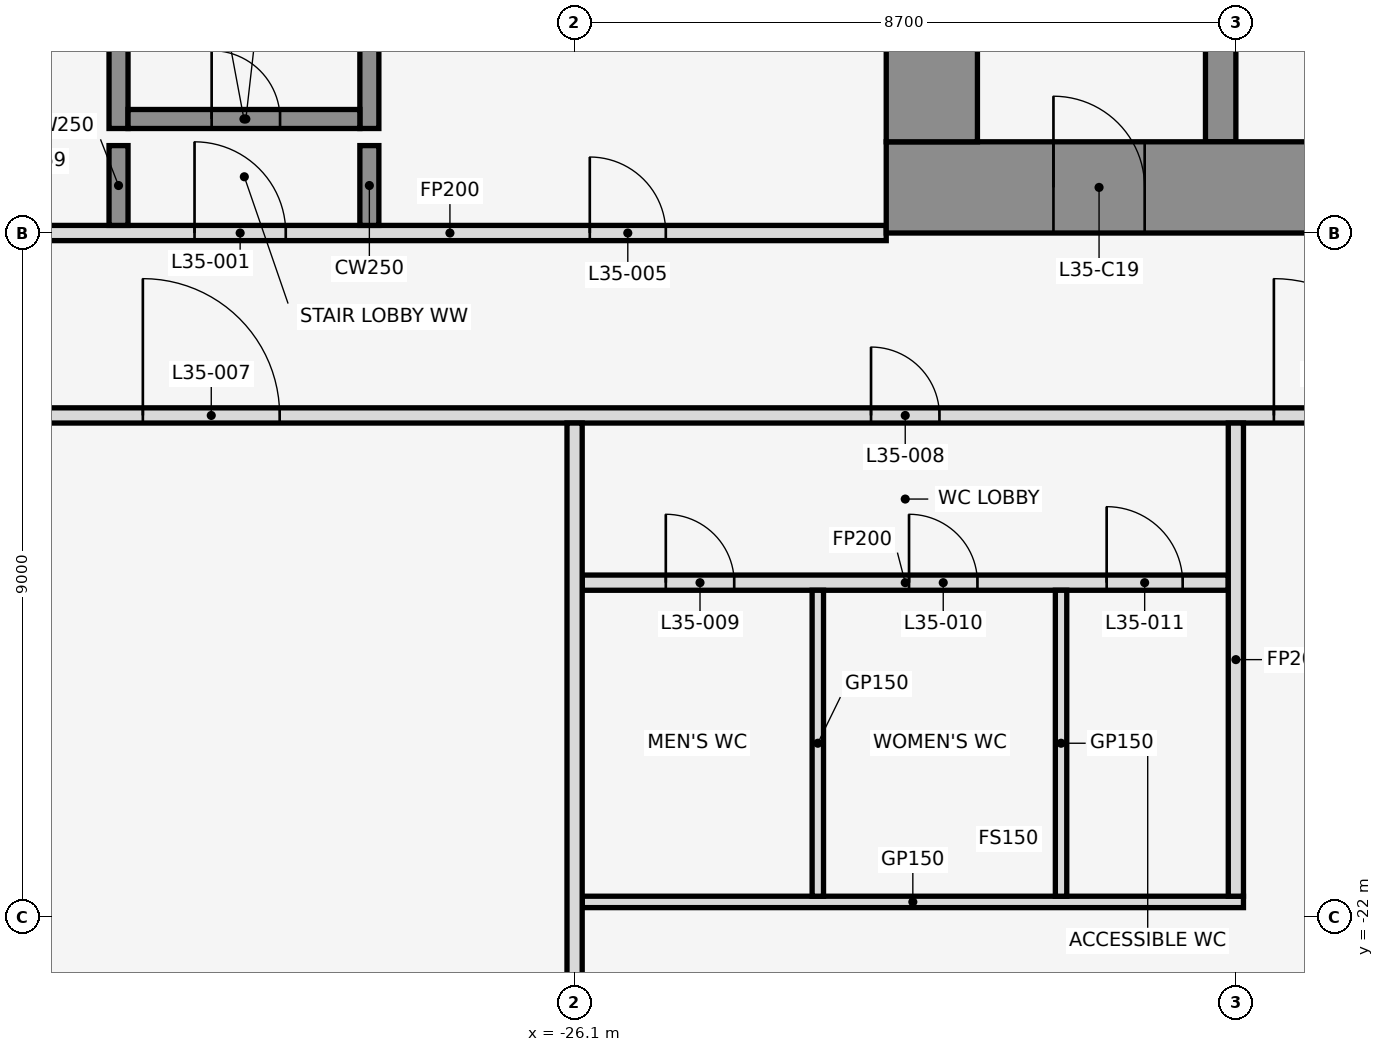
"""IFC4 building model, lengths in metres.
Left out: names, types, materials, properties, quantities, classifications, styles, units other than length and angle.
Written with IfcOpenShell. Run it as: python <this file> out.ifc"""

import sys

from ifc_helpers import new_model, si_unit, direction, frame, frame_2d, origin, place, context, subcontext, project, spatial, rectangle, extrude, element, fill, save


model = new_model("IFC4")
c1 = context("Model", 3, precision=1e-05, world=origin(), true_north=direction((0.0, 1.0)))
c2 = subcontext(c1, "Body", "Model", "MODEL_VIEW")
j1 = project(units=[si_unit("LENGTHUNIT", "METRE"), si_unit("PLANEANGLEUNIT", "RADIAN")], contexts=[c1])
p1 = place(None, origin())
s1 = spatial("IfcSite", under=j1, at=p1, CompositionType="ELEMENT")
p2 = place(p1, origin())
s2 = spatial("IfcBuilding", under=s1, at=p2, CompositionType="ELEMENT")
p3 = place(p2, frame((0.0, 0.0, 160.9)))
s3 = spatial("IfcBuildingStorey", under=s2, at=p3, CompositionType="ELEMENT", Elevation=160.9)
p4 = place(p3, frame((-32.1, -11.625, 0.0), z_axis=(0.0, 0.0, 1.0), x_axis=(0.0, 1.0, 0.0)))
e1 = element("IfcWall", 1, at=p4, inside=s3, PredefinedType="SHEAR", context=c2, shape_type="SweptSolid", body=[
    extrude(rectangle(XDim=7.325, YDim=0.25, at=frame_2d((3.663, 0.0))), origin(), (0.0, 0.0, 1.0), 4.1),
])
p5 = place(p3, frame((-28.8, -11.625, 0.0), z_axis=(0.0, 0.0, 1.0), x_axis=(0.0, 1.0, 0.0)))
e2 = element("IfcWall", 2, at=p5, inside=s3, PredefinedType="SHEAR", context=c2, shape_type="SweptSolid", body=[
    extrude(rectangle(XDim=7.25, YDim=0.25, at=frame_2d((3.625, 0.0))), origin(), (0.0, 0.0, 1.0), 4.1),
])
p6 = place(p3, frame((-31.975, -11.5, 0.0), z_axis=(0.0, 0.0, 1.0), x_axis=(1.0, 0.0, 0.0)))
e3 = element("IfcWall", 3, at=p6, inside=s3, PredefinedType="SHEAR", context=c2, shape_type="SweptSolid", body=[
    extrude(rectangle(XDim=3.05, YDim=0.25, at=frame_2d((1.525, 0.0))), origin(), (0.0, 0.0, 1.0), 4.1),
])
p7 = place(p6, frame((1.1, 0.0, 0.0)))
e4 = element("IfcOpeningElement", 4, at=p7, cuts=e3, PredefinedType="OPENING", context=c2, shape_type="SweptSolid", body=[
    extrude(rectangle(XDim=0.9, YDim=2.1, at=frame_2d((0.45, 1.05))), frame((0.0, 0.137, 0.0), z_axis=(0.0, -1.0, 0.0), x_axis=(1.0, 0.0, 0.0)), (0.0, 0.0, 1.0), 0.274),
])
p8 = place(p3, frame((-26.0, -21.8, 0.0), z_axis=(0.0, 0.0, 1.0), x_axis=(1.0, 0.0, 0.0)))
e5 = element("IfcWall", 5, at=p8, inside=s3, PredefinedType="PARTITIONING", context=c2, shape_type="SweptSolid", body=[
    extrude(rectangle(XDim=8.7, YDim=0.15, at=frame_2d((4.35, 0.0))), origin(), (0.0, 0.0, 1.0), 2.841),
])
p9 = place(p3, frame((-26.0, -17.6, 0.0), z_axis=(0.0, 0.0, 1.0), x_axis=(1.0, 0.0, 0.0)))
e6 = element("IfcWall", 6, at=p9, inside=s3, PredefinedType="PARTITIONING", context=c2, shape_type="SweptSolid", body=[
    extrude(rectangle(XDim=8.5, YDim=0.2, at=frame_2d((4.25, 0.0))), origin(), (0.0, 0.0, 1.0), 2.841),
])
p10 = place(p9, frame((1.1, 0.0, 0.0)))
e7 = element("IfcOpeningElement", 7, at=p10, cuts=e6, PredefinedType="OPENING", context=c2, shape_type="SweptSolid", body=[
    extrude(rectangle(XDim=0.9, YDim=2.1, at=frame_2d((0.45, 1.05))), frame((0.0, 0.112, 0.0), z_axis=(0.0, -1.0, 0.0), x_axis=(1.0, 0.0, 0.0)), (0.0, 0.0, 1.0), 0.224),
])
p11 = place(p9, frame((4.3, 0.0, 0.0)))
e8 = element("IfcOpeningElement", 8, at=p11, cuts=e6, PredefinedType="OPENING", context=c2, shape_type="SweptSolid", body=[
    extrude(rectangle(XDim=0.9, YDim=2.1, at=frame_2d((0.45, 1.05))), frame((0.0, 0.112, 0.0), z_axis=(0.0, -1.0, 0.0), x_axis=(1.0, 0.0, 0.0)), (0.0, 0.0, 1.0), 0.224),
])
p12 = place(p9, frame((6.9, 0.0, 0.0)))
e9 = element("IfcOpeningElement", 9, at=p12, cuts=e6, PredefinedType="OPENING", context=c2, shape_type="SweptSolid", body=[
    extrude(rectangle(XDim=1.0, YDim=2.1, at=frame_2d((0.5, 1.05))), frame((0.0, 0.112, 0.0), z_axis=(0.0, -1.0, 0.0), x_axis=(1.0, 0.0, 0.0)), (0.0, 0.0, 1.0), 0.224),
])
p13 = place(p3, frame((-35.68, -15.4, 0.0), z_axis=(0.0, 0.0, 1.0), x_axis=(1.0, 0.0, 0.0)))
e10 = element("IfcWall", 10, at=p13, inside=s3, PredefinedType="PARTITIONING", context=c2, shape_type="SweptSolid", body=[
    extrude(rectangle(XDim=71.36, YDim=0.2, at=frame_2d((35.68, 0.0))), origin(), (0.0, 0.0, 1.0), 2.841),
])
p14 = place(p13, frame((3.9, 0.0, 0.0)))
e11 = element("IfcOpeningElement", 11, at=p14, cuts=e10, PredefinedType="OPENING", context=c2, shape_type="SweptSolid", body=[
    extrude(rectangle(XDim=1.8, YDim=2.1, at=frame_2d((0.9, 1.05))), frame((0.0, 0.112, 0.0), z_axis=(0.0, -1.0, 0.0), x_axis=(1.0, 0.0, 0.0)), (0.0, 0.0, 1.0), 0.224),
])
p15 = place(p13, frame((13.48, 0.0, 0.0)))
e12 = element("IfcOpeningElement", 12, at=p15, cuts=e10, PredefinedType="OPENING", context=c2, shape_type="SweptSolid", body=[
    extrude(rectangle(XDim=0.9, YDim=2.1, at=frame_2d((0.45, 1.05))), frame((0.0, 0.112, 0.0), z_axis=(0.0, -1.0, 0.0), x_axis=(1.0, 0.0, 0.0)), (0.0, 0.0, 1.0), 0.224),
])
p16 = place(p13, frame((18.78, 0.0, 0.0)))
e13 = element("IfcOpeningElement", 13, at=p16, cuts=e10, PredefinedType="OPENING", context=c2, shape_type="SweptSolid", body=[
    extrude(rectangle(XDim=1.8, YDim=2.1, at=frame_2d((0.9, 1.05))), frame((0.0, 0.112, 0.0), z_axis=(0.0, -1.0, 0.0), x_axis=(1.0, 0.0, 0.0)), (0.0, 0.0, 1.0), 0.224),
])
p17 = place(p13, frame((24.58, 0.0, 0.0)))
e14 = element("IfcOpeningElement", 14, at=p17, cuts=e10, PredefinedType="OPENING", context=c2, shape_type="SweptSolid", body=[
    extrude(rectangle(XDim=1.8, YDim=2.1, at=frame_2d((0.9, 1.05))), frame((0.0, 0.112, 0.0), z_axis=(0.0, -1.0, 0.0), x_axis=(1.0, 0.0, 0.0)), (0.0, 0.0, 1.0), 0.224),
])
p18 = place(p13, frame((34.78, 0.0, 0.0)))
e15 = element("IfcOpeningElement", 15, at=p18, cuts=e10, PredefinedType="OPENING", context=c2, shape_type="SweptSolid", body=[
    extrude(rectangle(XDim=1.8, YDim=2.1, at=frame_2d((0.9, 1.05))), frame((0.0, 0.112, 0.0), z_axis=(0.0, -1.0, 0.0), x_axis=(1.0, 0.0, 0.0)), (0.0, 0.0, 1.0), 0.224),
])
p19 = place(p13, frame((43.48, 0.0, 0.0)))
e16 = element("IfcOpeningElement", 16, at=p19, cuts=e10, PredefinedType="OPENING", context=c2, shape_type="SweptSolid", body=[
    extrude(rectangle(XDim=1.8, YDim=2.1, at=frame_2d((0.9, 1.05))), frame((0.0, 0.112, 0.0), z_axis=(0.0, -1.0, 0.0), x_axis=(1.0, 0.0, 0.0)), (0.0, 0.0, 1.0), 0.224),
])
p20 = place(p13, frame((52.18, 0.0, 0.0)))
e17 = element("IfcOpeningElement", 17, at=p20, cuts=e10, PredefinedType="OPENING", context=c2, shape_type="SweptSolid", body=[
    extrude(rectangle(XDim=1.8, YDim=2.1, at=frame_2d((0.9, 1.05))), frame((0.0, 0.112, 0.0), z_axis=(0.0, -1.0, 0.0), x_axis=(1.0, 0.0, 0.0)), (0.0, 0.0, 1.0), 0.224),
])
p21 = place(p13, frame((64.18, 0.0, 0.0)))
e18 = element("IfcOpeningElement", 18, at=p21, cuts=e10, PredefinedType="OPENING", context=c2, shape_type="SweptSolid", body=[
    extrude(rectangle(XDim=1.8, YDim=2.1, at=frame_2d((0.9, 1.05))), frame((0.0, 0.112, 0.0), z_axis=(0.0, -1.0, 0.0), x_axis=(1.0, 0.0, 0.0)), (0.0, 0.0, 1.0), 0.224),
])
p22 = place(p3, frame((-33.48, -13.0, 0.0), z_axis=(0.0, 0.0, 1.0), x_axis=(1.0, 0.0, 0.0)))
e19 = element("IfcWall", 19, at=p22, inside=s3, PredefinedType="PARTITIONING", context=c2, shape_type="SweptSolid", body=[
    extrude(rectangle(XDim=11.48, YDim=0.2, at=frame_2d((5.74, 0.0))), origin(), (0.0, 0.0, 1.0), 2.841),
])
p23 = place(p22, frame((2.38, 0.0, 0.0)))
e20 = element("IfcOpeningElement", 20, at=p23, cuts=e19, PredefinedType="OPENING", context=c2, shape_type="SweptSolid", body=[
    extrude(rectangle(XDim=1.2, YDim=2.1, at=frame_2d((0.6, 1.05))), frame((0.0, 0.112, 0.0), z_axis=(0.0, -1.0, 0.0), x_axis=(1.0, 0.0, 0.0)), (0.0, 0.0, 1.0), 0.224),
])
p24 = place(p22, frame((7.58, 0.0, 0.0)))
e21 = element("IfcOpeningElement", 21, at=p24, cuts=e19, PredefinedType="OPENING", context=c2, shape_type="SweptSolid", body=[
    extrude(rectangle(XDim=1.0, YDim=2.1, at=frame_2d((0.5, 1.05))), frame((0.0, 0.112, 0.0), z_axis=(0.0, -1.0, 0.0), x_axis=(1.0, 0.0, 0.0)), (0.0, 0.0, 1.0), 0.224),
])
for number, where, z_axis, x_axis in (
    (22, (-32.1, -12.9, 0.0), (0.0, 0.0, 1.0), (0.0, 1.0, 0.0)),
    (23, (-28.8, -12.9, 0.0), (0.0, 0.0, 1.0), (0.0, 1.0, 0.0)),
):
    element("IfcWall", number, at=place(p3, frame(where, z_axis=z_axis, x_axis=x_axis)), inside=s3, PredefinedType="SHEAR", context=c2, shape_type="SweptSolid", body=[
        extrude(rectangle(XDim=1.05, YDim=0.25, at=frame_2d((0.525, 0.0))), origin(), (0.0, 0.0, 1.0), 4.1),
    ])
p25 = place(p3, frame((-26.1, -34.71, 0.0), z_axis=(0.0, 0.0, 1.0), x_axis=(0.0, 1.0, 0.0)))
e24 = element("IfcWall", 24, at=p25, inside=s3, PredefinedType="PARTITIONING", context=c2, shape_type="SweptSolid", body=[
    extrude(rectangle(XDim=19.21, YDim=0.2, at=frame_2d((9.605, 0.0))), origin(), (0.0, 0.0, 1.0), 2.841),
])
for number, where, z_axis, x_axis in (
    (25, (-22.9, -21.725, 0.0), (0.0, 0.0, 1.0), (0.0, 1.0, 0.0)),
    (26, (-19.7, -21.725, 0.0), (0.0, 0.0, 1.0), (0.0, 1.0, 0.0)),
):
    element("IfcWall", number, at=place(p3, frame(where, z_axis=z_axis, x_axis=x_axis)), inside=s3, PredefinedType="PARTITIONING", context=c2, shape_type="SweptSolid", body=[
        extrude(rectangle(XDim=4.025, YDim=0.15, at=frame_2d((2.013, 0.0))), origin(), (0.0, 0.0, 1.0), 2.841),
    ])
p26 = place(p3, frame((-17.4, -21.725, 0.0), z_axis=(0.0, 0.0, 1.0), x_axis=(0.0, 1.0, 0.0)))
e27 = element("IfcWall", 27, at=p26, inside=s3, PredefinedType="PARTITIONING", context=c2, shape_type="SweptSolid", body=[
    extrude(rectangle(XDim=6.225, YDim=0.2, at=frame_2d((3.113, 0.0))), origin(), (0.0, 0.0, 1.0), 2.841),
])
p27 = place(p3, frame((-17.6, -11.8, 0.0), z_axis=(0.0, 0.0, 1.0), x_axis=(0.0, 1.0, 0.0)))
e28 = element("IfcWall", 28, at=p27, inside=s3, PredefinedType="SHEAR", context=c2, shape_type="SweptSolid", body=[
    extrude(rectangle(XDim=10.6, YDim=0.4, at=frame_2d((5.3, 0.0))), origin(), (0.0, 0.0, 1.0), 4.1),
])
p28 = place(p27, frame((1.25, 0.0, 0.0)))
e29 = element("IfcOpeningElement", 29, at=p28, cuts=e28, PredefinedType="OPENING", context=c2, shape_type="SweptSolid", body=[
    extrude(rectangle(XDim=1.1, YDim=2.1, at=frame_2d((0.55, 1.05))), frame((0.0, 0.212, 0.0), z_axis=(0.0, -1.0, 0.0), x_axis=(1.0, 0.0, 0.0)), (0.0, 0.0, 1.0), 0.424),
])
p29 = place(p27, frame((3.95, 0.0, 0.0)))
e30 = element("IfcOpeningElement", 30, at=p29, cuts=e28, PredefinedType="OPENING", context=c2, shape_type="SweptSolid", body=[
    extrude(rectangle(XDim=1.1, YDim=2.1, at=frame_2d((0.55, 1.05))), frame((0.0, 0.212, 0.0), z_axis=(0.0, -1.0, 0.0), x_axis=(1.0, 0.0, 0.0)), (0.0, 0.0, 1.0), 0.424),
])
p30 = place(p3, frame((-22.0, -12.4, 0.0), z_axis=(0.0, 0.0, 1.0), x_axis=(1.0, 0.0, 0.0)))
e31 = element("IfcWall", 31, at=p30, inside=s3, PredefinedType="SHEAR", context=c2, shape_type="SweptSolid", body=[
    extrude(rectangle(XDim=44.0, YDim=1.2, at=frame_2d((22.0, 0.0))), origin(), (0.0, 0.0, 1.0), 4.1),
])
p31 = place(p30, frame((2.2, 0.0, 0.0)))
e32 = element("IfcOpeningElement", 32, at=p31, cuts=e31, PredefinedType="OPENING", context=c2, shape_type="SweptSolid", body=[
    extrude(rectangle(XDim=1.2, YDim=2.1, at=frame_2d((0.6, 1.05))), frame((0.0, 0.612, 0.0), z_axis=(0.0, -1.0, 0.0), x_axis=(1.0, 0.0, 0.0)), (0.0, 0.0, 1.0), 1.224),
])
p32 = place(p30, frame((21.4, 0.0, 0.0)))
e33 = element("IfcOpeningElement", 33, at=p32, cuts=e31, PredefinedType="OPENING", context=c2, shape_type="SweptSolid", body=[
    extrude(rectangle(XDim=1.2, YDim=2.1, at=frame_2d((0.6, 1.05))), frame((0.0, 0.612, 0.0), z_axis=(0.0, -1.0, 0.0), x_axis=(1.0, 0.0, 0.0)), (0.0, 0.0, 1.0), 1.224),
])
p33 = place(p30, frame((40.6, 0.0, 0.0)))
e34 = element("IfcOpeningElement", 34, at=p33, cuts=e31, PredefinedType="OPENING", context=c2, shape_type="SweptSolid", body=[
    extrude(rectangle(XDim=1.2, YDim=2.1, at=frame_2d((0.6, 1.05))), frame((0.0, 0.612, 0.0), z_axis=(0.0, -1.0, 0.0), x_axis=(1.0, 0.0, 0.0)), (0.0, 0.0, 1.0), 1.224),
])
p34 = place(p30, frame((16.0, 0.0, 0.0)))
e35 = element("IfcOpeningElement", 35, at=p34, cuts=e31, PredefinedType="OPENING", context=c2, shape_type="SweptSolid", body=[
    extrude(rectangle(XDim=1.8, YDim=2.1, at=frame_2d((0.9, 1.05))), frame((0.0, 0.612, 0.0), z_axis=(0.0, -1.0, 0.0), x_axis=(1.0, 0.0, 0.0)), (0.0, 0.0, 1.0), 1.224),
])
p35 = place(p30, frame((6.3, 0.0, 0.0)))
e36 = element("IfcOpeningElement", 36, at=p35, cuts=e31, PredefinedType="OPENING", context=c2, shape_type="SweptSolid", body=[
    extrude(rectangle(XDim=1.2, YDim=2.1, at=frame_2d((0.6, 1.05))), frame((0.0, 0.612, 0.0), z_axis=(0.0, -1.0, 0.0), x_axis=(1.0, 0.0, 0.0)), (0.0, 0.0, 1.0), 1.224),
])
p36 = place(p30, frame((26.2, 0.0, 0.0)))
e37 = element("IfcOpeningElement", 37, at=p36, cuts=e31, PredefinedType="OPENING", context=c2, shape_type="SweptSolid", body=[
    extrude(rectangle(XDim=1.8, YDim=2.1, at=frame_2d((0.9, 1.05))), frame((0.0, 0.612, 0.0), z_axis=(0.0, -1.0, 0.0), x_axis=(1.0, 0.0, 0.0)), (0.0, 0.0, 1.0), 1.224),
])
p37 = place(p30, frame((36.5, 0.0, 0.0)))
e38 = element("IfcOpeningElement", 38, at=p37, cuts=e31, PredefinedType="OPENING", context=c2, shape_type="SweptSolid", body=[
    extrude(rectangle(XDim=1.2, YDim=2.1, at=frame_2d((0.6, 1.05))), frame((0.0, 0.612, 0.0), z_axis=(0.0, -1.0, 0.0), x_axis=(1.0, 0.0, 0.0)), (0.0, 0.0, 1.0), 1.224),
])
p38 = place(p3, frame((-21.4, -11.8, 0.0), z_axis=(0.0, 0.0, 1.0), x_axis=(0.0, 1.0, 0.0)))
e39 = element("IfcWall", 39, at=p38, inside=s3, PredefinedType="SHEAR", context=c2, shape_type="SweptSolid", body=[
    extrude(rectangle(XDim=10.6, YDim=1.2, at=frame_2d((5.3, 0.0))), origin(), (0.0, 0.0, 1.0), 4.1),
])
p39 = place(p23, origin())
e40 = element("IfcDoor", 40, at=p39, inside=s3, OperationType="SINGLE_SWING_LEFT", PredefinedType="DOOR", context=c2, shape_type="SweptSolid", body=[
    extrude(rectangle(XDim=1.2, YDim=2.1, at=frame_2d((0.6, 1.05))), frame((0.0, 0.025, 0.0), z_axis=(0.0, -1.0, 0.0), x_axis=(1.0, 0.0, 0.0)), (0.0, 0.0, 1.0), 0.05),
])
fill(e20, e40)
p40 = place(p7, origin())
e41 = element("IfcDoor", 41, at=p40, inside=s3, OperationType="SINGLE_SWING_LEFT", PredefinedType="DOOR", context=c2, shape_type="SweptSolid", body=[
    extrude(rectangle(XDim=0.9, YDim=2.1, at=frame_2d((0.45, 1.05))), frame((0.0, 0.025, 0.0), z_axis=(0.0, -1.0, 0.0), x_axis=(1.0, 0.0, 0.0)), (0.0, 0.0, 1.0), 0.05),
])
fill(e4, e41)
p41 = place(p24, origin())
e42 = element("IfcDoor", 42, at=p41, inside=s3, OperationType="SINGLE_SWING_LEFT", PredefinedType="DOOR", context=c2, shape_type="SweptSolid", body=[
    extrude(rectangle(XDim=1.0, YDim=2.1, at=frame_2d((0.5, 1.05))), frame((0.0, 0.025, 0.0), z_axis=(0.0, -1.0, 0.0), x_axis=(1.0, 0.0, 0.0)), (0.0, 0.0, 1.0), 0.05),
])
fill(e21, e42)
p42 = place(p14, origin())
e43 = element("IfcDoor", 43, at=p42, inside=s3, OperationType="SINGLE_SWING_LEFT", PredefinedType="DOOR", context=c2, shape_type="SweptSolid", body=[
    extrude(rectangle(XDim=1.8, YDim=2.1, at=frame_2d((0.9, 1.05))), frame((0.0, 0.025, 0.0), z_axis=(0.0, -1.0, 0.0), x_axis=(1.0, 0.0, 0.0)), (0.0, 0.0, 1.0), 0.05),
])
fill(e11, e43)
p43 = place(p15, frame((0.9, 0.0, 0.0), z_axis=(0.0, 0.0, 1.0), x_axis=(-1.0, 0.0, 0.0)))
e44 = element("IfcDoor", 44, at=p43, inside=s3, OperationType="SINGLE_SWING_RIGHT", PredefinedType="DOOR", context=c2, shape_type="SweptSolid", body=[
    extrude(rectangle(XDim=0.9, YDim=2.1, at=frame_2d((0.45, 1.05))), frame((0.0, 0.025, 0.0), z_axis=(0.0, -1.0, 0.0), x_axis=(1.0, 0.0, 0.0)), (0.0, 0.0, 1.0), 0.05),
])
fill(e12, e44)
p44 = place(p10, frame((0.9, 0.0, 0.0), z_axis=(0.0, 0.0, 1.0), x_axis=(-1.0, 0.0, 0.0)))
e45 = element("IfcDoor", 45, at=p44, inside=s3, OperationType="SINGLE_SWING_RIGHT", PredefinedType="DOOR", context=c2, shape_type="SweptSolid", body=[
    extrude(rectangle(XDim=0.9, YDim=2.1, at=frame_2d((0.45, 1.05))), frame((0.0, 0.025, 0.0), z_axis=(0.0, -1.0, 0.0), x_axis=(1.0, 0.0, 0.0)), (0.0, 0.0, 1.0), 0.05),
])
fill(e7, e45)
p45 = place(p11, frame((0.9, 0.0, 0.0), z_axis=(0.0, 0.0, 1.0), x_axis=(-1.0, 0.0, 0.0)))
e46 = element("IfcDoor", 46, at=p45, inside=s3, OperationType="SINGLE_SWING_LEFT", PredefinedType="DOOR", context=c2, shape_type="SweptSolid", body=[
    extrude(rectangle(XDim=0.9, YDim=2.1, at=frame_2d((0.45, 1.05))), frame((0.0, 0.025, 0.0), z_axis=(0.0, -1.0, 0.0), x_axis=(1.0, 0.0, 0.0)), (0.0, 0.0, 1.0), 0.05),
])
fill(e8, e46)
p46 = place(p12, frame((1.0, 0.0, 0.0), z_axis=(0.0, 0.0, 1.0), x_axis=(-1.0, 0.0, 0.0)))
e47 = element("IfcDoor", 47, at=p46, inside=s3, OperationType="SINGLE_SWING_RIGHT", PredefinedType="DOOR", context=c2, shape_type="SweptSolid", body=[
    extrude(rectangle(XDim=1.0, YDim=2.1, at=frame_2d((0.5, 1.05))), frame((0.0, 0.025, 0.0), z_axis=(0.0, -1.0, 0.0), x_axis=(1.0, 0.0, 0.0)), (0.0, 0.0, 1.0), 0.05),
])
fill(e9, e47)
p47 = place(p16, origin())
e48 = element("IfcDoor", 48, at=p47, inside=s3, OperationType="SINGLE_SWING_LEFT", PredefinedType="DOOR", context=c2, shape_type="SweptSolid", body=[
    extrude(rectangle(XDim=1.8, YDim=2.1, at=frame_2d((0.9, 1.05))), frame((0.0, 0.025, 0.0), z_axis=(0.0, -1.0, 0.0), x_axis=(1.0, 0.0, 0.0)), (0.0, 0.0, 1.0), 0.05),
])
fill(e13, e48)
p48 = place(p31, frame((1.2, 0.0, 0.0), z_axis=(0.0, 0.0, 1.0), x_axis=(-1.0, 0.0, 0.0)))
e49 = element("IfcDoor", 49, at=p48, inside=s3, OperationType="SINGLE_SWING_RIGHT", PredefinedType="DOOR", context=c2, shape_type="SweptSolid", body=[
    extrude(rectangle(XDim=1.2, YDim=2.1, at=frame_2d((0.6, 1.05))), frame((0.0, 0.025, 0.0), z_axis=(0.0, -1.0, 0.0), x_axis=(1.0, 0.0, 0.0)), (0.0, 0.0, 1.0), 0.05),
])
fill(e32, e49)
save(model, sys.argv[1])
